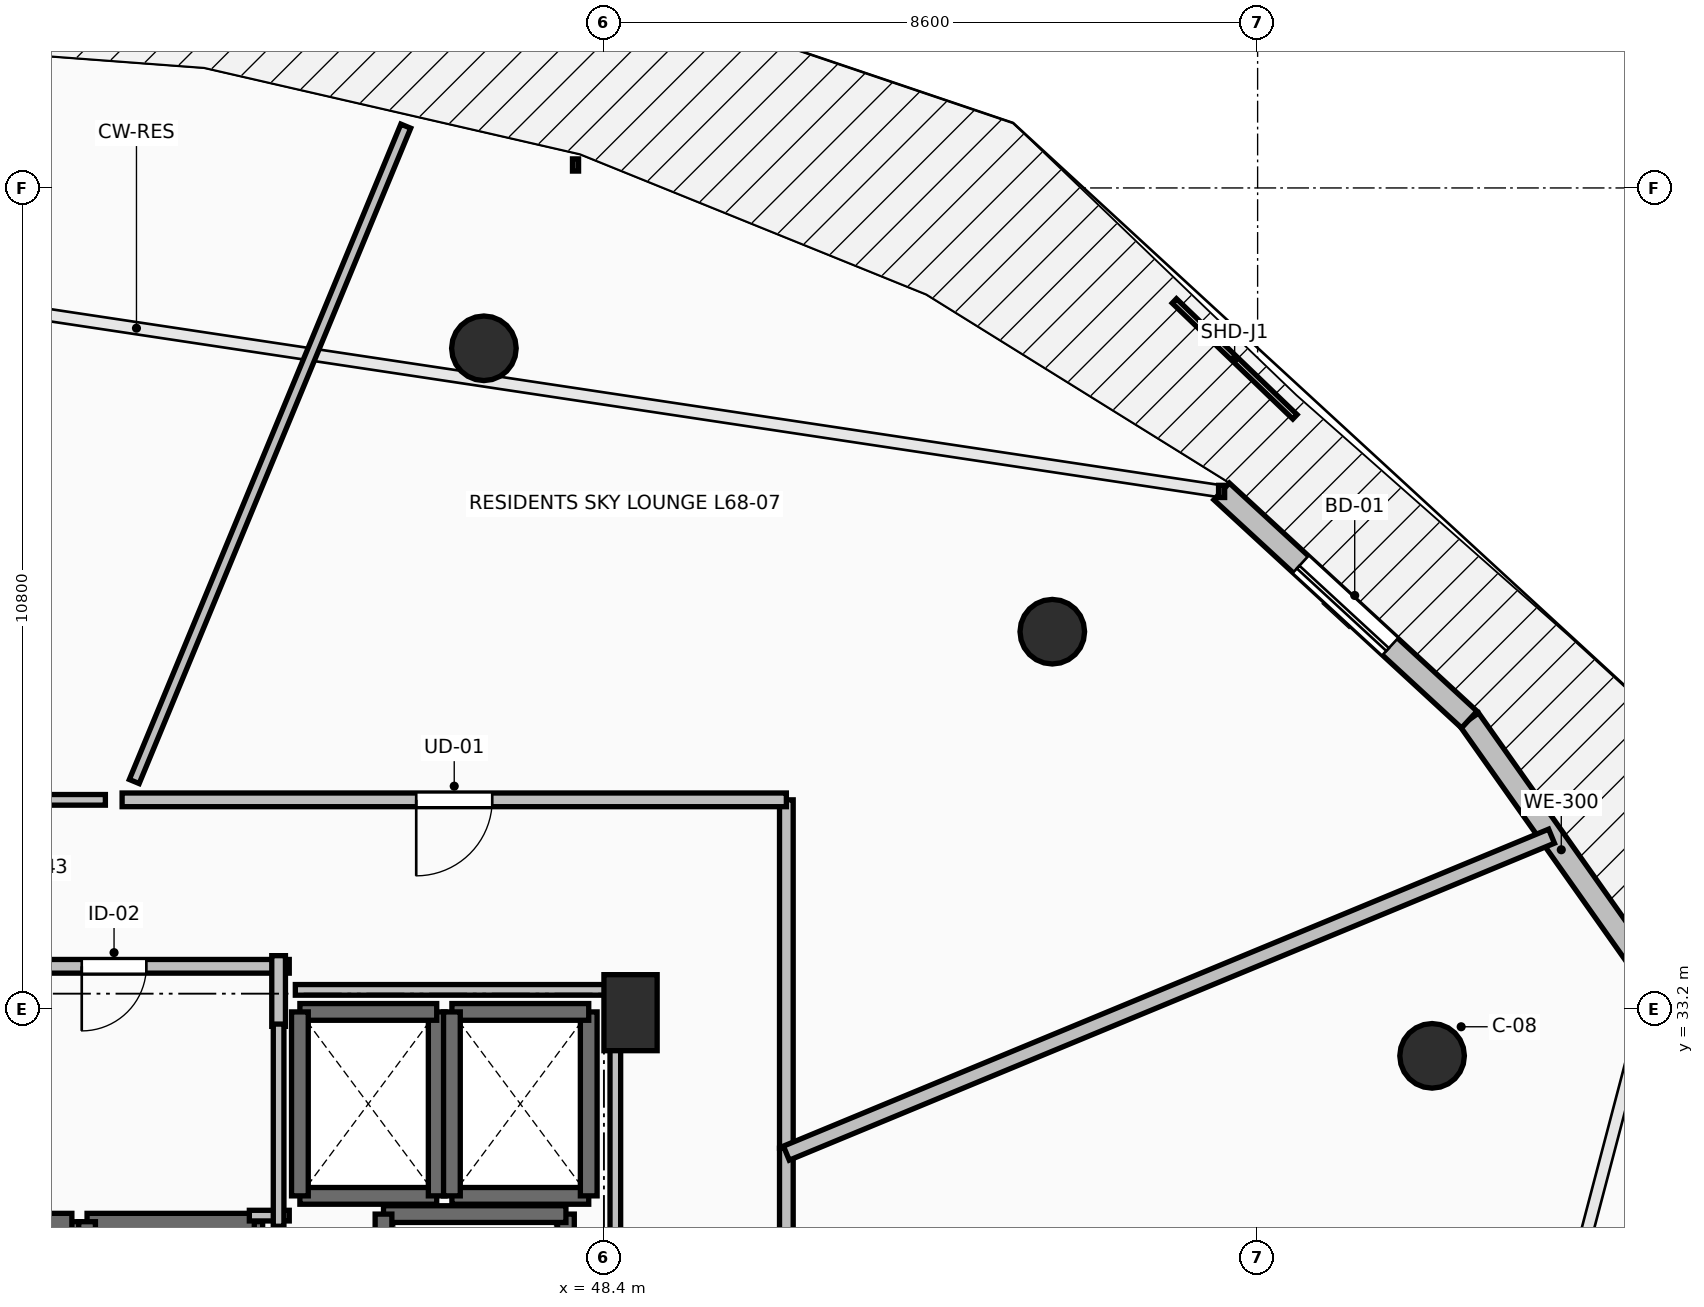
"""IFC4 building model, lengths in metres.
Left out: names, types, materials, properties, quantities, classifications, styles, units other than length and angle.
Written with IfcOpenShell. Run it as: python <this file> out.ifc"""

import sys

from ifc_helpers import new_model, si_unit, direction, frame, frame_2d, origin, origin_2d, place, context, subcontext, project, spatial, rectangle, circle, extrude, element, fill, save


model = new_model("IFC4")
c1 = context("Model", 3, precision=1e-05, world=origin(), true_north=direction((0.0, 1.0)))
c2 = subcontext(c1, "Body", "Model", "MODEL_VIEW")
j1 = project(units=[si_unit("LENGTHUNIT", "METRE"), si_unit("PLANEANGLEUNIT", "RADIAN")], contexts=[c1])
p1 = place(None, origin())
s1 = spatial("IfcSite", under=j1, at=p1, CompositionType="ELEMENT")
p2 = place(p1, origin())
s2 = spatial("IfcBuilding", under=s1, at=p2, CompositionType="ELEMENT")
p3 = place(p2, frame((0.0, 0.0, 252.0)))
s3 = spatial("IfcBuildingStorey", under=s2, at=p3, CompositionType="ELEMENT", Elevation=252.0)
for number, where, z_axis, x_axis in (
    (1, (59.295, 32.582, 0.0), (0.0, 0.0, 1.0), (0.924, 0.383, 0.0)),
    (2, (54.299, 38.162, 0.0), (0.0, 0.0, 1.0), (0.707, 0.707, 0.0)),
    (3, (46.821, 41.891, 0.0), (0.0, 0.0, 1.0), (0.383, 0.924, 0.0)),
):
    element("IfcColumn", number, at=place(p3, frame(where, z_axis=z_axis, x_axis=x_axis)), inside=s3, PredefinedType="COLUMN", context=c2, shape_type="SweptSolid", body=[
        extrude(circle(Radius=0.425, at=origin_2d()), origin(), (0.0, 0.0, 1.0), 3.55),
    ])
p4 = place(p3, frame((48.75, 33.15, 0.0), z_axis=(0.0, 0.0, 1.0), x_axis=(1.0, 0.0, 0.0)))
e4 = element("IfcColumn", 4, at=p4, inside=s3, PredefinedType="PILASTER", context=c2, shape_type="SweptSolid", body=[
    extrude(rectangle(XDim=0.7, YDim=1.0, at=origin_2d()), origin(), (0.0, 0.0, 1.0), 3.55),
])
p5 = place(p3, frame((62.206, 33.581, 0.0), z_axis=(0.0, 0.0, 1.0), x_axis=(-0.577261247247, 0.816559521668, 0.0)))
e5 = element("IfcWall", 5, at=p5, inside=s3, PredefinedType="STANDARD", context=c2, shape_type="SweptSolid", body=[
    extrude(rectangle(XDim=4.194, YDim=0.3, at=frame_2d((2.097, 0.0))), origin(), (0.0, 0.0, 1.0), 3.29),
])
p6 = place(p3, frame((59.784, 37.006, 0.0), z_axis=(0.0, 0.0, 1.0), x_axis=(-0.735445373611, 0.677584018727, 0.0)))
e6 = element("IfcWall", 6, at=p6, inside=s3, PredefinedType="STANDARD", context=c2, shape_type="SweptSolid", body=[
    extrude(rectangle(XDim=4.43, YDim=0.3, at=frame_2d((2.215, 0.0))), origin(), (0.0, 0.0, 1.0), 3.29),
])
p7 = place(p6, frame((1.415, 0.0, 0.0)))
e7 = element("IfcOpeningElement", 7, at=p7, cuts=e6, PredefinedType="OPENING", context=c2, shape_type="SweptSolid", body=[
    extrude(rectangle(XDim=1.6, YDim=2.3, at=frame_2d((0.8, 1.15))), frame((0.0, 0.165, 0.0), z_axis=(0.0, -1.0, 0.0), x_axis=(1.0, 0.0, 0.0)), (0.0, 0.0, 1.0), 0.33),
])
p8 = place(p3, frame((41.4, 27.8, 0.0), z_axis=(0.0, 0.0, 1.0), x_axis=(0.0, 1.0, 0.0)))
e8 = element("IfcWall", 8, at=p8, inside=s3, PredefinedType="SOLIDWALL", context=c2, shape_type="SweptSolid", body=[
    extrude(rectangle(XDim=2.6, YDim=0.22, at=frame_2d((1.3, 0.0))), origin(), (0.0, 0.0, 1.0), 3.29),
])
p9 = place(p3, frame((41.4, 30.4, 0.0), z_axis=(0.0, 0.0, 1.0), x_axis=(-1.0, 0.0, 0.0)))
e9 = element("IfcWall", 9, at=p9, inside=s3, PredefinedType="SOLIDWALL", context=c2, shape_type="SweptSolid", body=[
    extrude(rectangle(XDim=2.2, YDim=0.22, at=frame_2d((1.1, 0.0))), origin(), (0.0, 0.0, 1.0), 3.29),
])
p10 = place(p3, frame((43.8, 27.8, 0.0), z_axis=(0.0, 0.0, 1.0), x_axis=(0.0, 1.0, 0.0)))
e10 = element("IfcWall", 10, at=p10, inside=s3, PredefinedType="SOLIDWALL", context=c2, shape_type="SweptSolid", body=[
    extrude(rectangle(XDim=2.6, YDim=0.22, at=frame_2d((1.3, 0.0))), origin(), (0.0, 0.0, 1.0), 3.29),
])
p11 = place(p3, frame((43.8, 30.4, 0.0), z_axis=(0.0, 0.0, 1.0), x_axis=(-1.0, 0.0, 0.0)))
e11 = element("IfcWall", 11, at=p11, inside=s3, PredefinedType="SOLIDWALL", context=c2, shape_type="SweptSolid", body=[
    extrude(rectangle(XDim=2.2, YDim=0.22, at=frame_2d((1.1, 0.0))), origin(), (0.0, 0.0, 1.0), 3.29),
])
p12 = place(p3, frame((41.6, 30.4, 0.0), z_axis=(0.0, 0.0, 1.0), x_axis=(0.0, -1.0, 0.0)))
e12 = element("IfcWall", 12, at=p12, inside=s3, PredefinedType="SOLIDWALL", context=c2, shape_type="SweptSolid", body=[
    extrude(rectangle(XDim=2.6, YDim=0.22, at=frame_2d((1.3, 0.0))), origin(), (0.0, 0.0, 1.0), 3.29),
])
p13 = place(p3, frame((44.4, 30.74, 0.0), z_axis=(0.0, 0.0, 1.0), x_axis=(1.0, 0.0, 0.0)))
e13 = element("IfcWall", 13, at=p13, inside=s3, PredefinedType="SOLIDWALL", context=c2, shape_type="SweptSolid", body=[
    extrude(rectangle(XDim=1.8, YDim=0.22, at=frame_2d((0.9, 0.0))), origin(), (0.0, 0.0, 1.0), 3.29),
])
p14 = place(p3, frame((46.2, 30.74, 0.0), z_axis=(0.0, 0.0, 1.0), x_axis=(0.0, 1.0, 0.0)))
e14 = element("IfcWall", 14, at=p14, inside=s3, PredefinedType="SOLIDWALL", context=c2, shape_type="SweptSolid", body=[
    extrude(rectangle(XDim=2.42, YDim=0.22, at=frame_2d((1.21, 0.0))), origin(), (0.0, 0.0, 1.0), 3.29),
])
p15 = place(p3, frame((46.2, 33.16, 0.0), z_axis=(0.0, 0.0, 1.0), x_axis=(-1.0, 0.0, 0.0)))
e15 = element("IfcWall", 15, at=p15, inside=s3, PredefinedType="SOLIDWALL", context=c2, shape_type="SweptSolid", body=[
    extrude(rectangle(XDim=1.8, YDim=0.22, at=frame_2d((0.9, 0.0))), origin(), (0.0, 0.0, 1.0), 3.29),
])
p16 = place(p3, frame((44.4, 33.16, 0.0), z_axis=(0.0, 0.0, 1.0), x_axis=(0.0, -1.0, 0.0)))
e16 = element("IfcWall", 16, at=p16, inside=s3, PredefinedType="SOLIDWALL", context=c2, shape_type="SweptSolid", body=[
    extrude(rectangle(XDim=2.42, YDim=0.22, at=frame_2d((1.21, 0.0))), origin(), (0.0, 0.0, 1.0), 3.29),
])
p17 = place(p3, frame((46.4, 30.74, 0.0), z_axis=(0.0, 0.0, 1.0), x_axis=(1.0, 0.0, 0.0)))
e17 = element("IfcWall", 17, at=p17, inside=s3, PredefinedType="SOLIDWALL", context=c2, shape_type="SweptSolid", body=[
    extrude(rectangle(XDim=1.8, YDim=0.22, at=frame_2d((0.9, 0.0))), origin(), (0.0, 0.0, 1.0), 3.29),
])
p18 = place(p3, frame((48.2, 30.74, 0.0), z_axis=(0.0, 0.0, 1.0), x_axis=(0.0, 1.0, 0.0)))
e18 = element("IfcWall", 18, at=p18, inside=s3, PredefinedType="SOLIDWALL", context=c2, shape_type="SweptSolid", body=[
    extrude(rectangle(XDim=2.42, YDim=0.22, at=frame_2d((1.21, 0.0))), origin(), (0.0, 0.0, 1.0), 3.29),
])
p19 = place(p3, frame((48.2, 33.16, 0.0), z_axis=(0.0, 0.0, 1.0), x_axis=(-1.0, 0.0, 0.0)))
e19 = element("IfcWall", 19, at=p19, inside=s3, PredefinedType="SOLIDWALL", context=c2, shape_type="SweptSolid", body=[
    extrude(rectangle(XDim=1.8, YDim=0.22, at=frame_2d((0.9, 0.0))), origin(), (0.0, 0.0, 1.0), 3.29),
])
p20 = place(p3, frame((46.4, 33.16, 0.0), z_axis=(0.0, 0.0, 1.0), x_axis=(0.0, -1.0, 0.0)))
e20 = element("IfcWall", 20, at=p20, inside=s3, PredefinedType="SOLIDWALL", context=c2, shape_type="SweptSolid", body=[
    extrude(rectangle(XDim=2.42, YDim=0.22, at=frame_2d((1.21, 0.0))), origin(), (0.0, 0.0, 1.0), 3.29),
])
p21 = place(p3, frame((47.9, 28.0, 0.0), z_axis=(0.0, 0.0, 1.0), x_axis=(0.0, 1.0, 0.0)))
e21 = element("IfcWall", 21, at=p21, inside=s3, PredefinedType="SHEAR", context=c2, shape_type="SweptSolid", body=[
    extrude(rectangle(XDim=2.5, YDim=0.22, at=frame_2d((1.25, 0.0))), origin(), (0.0, 0.0, 1.0), 3.29),
])
p22 = place(p3, frame((47.9, 30.5, 0.0), z_axis=(0.0, 0.0, 1.0), x_axis=(-1.0, 0.0, 0.0)))
e22 = element("IfcWall", 22, at=p22, inside=s3, PredefinedType="SHEAR", context=c2, shape_type="SweptSolid", body=[
    extrude(rectangle(XDim=2.4, YDim=0.22, at=frame_2d((1.2, 0.0))), origin(), (0.0, 0.0, 1.0), 3.29),
])
p23 = place(p3, frame((45.5, 30.5, 0.0), z_axis=(0.0, 0.0, 1.0), x_axis=(0.0, -1.0, 0.0)))
e23 = element("IfcWall", 23, at=p23, inside=s3, PredefinedType="SHEAR", context=c2, shape_type="SweptSolid", body=[
    extrude(rectangle(XDim=2.5, YDim=0.22, at=frame_2d((1.25, 0.0))), origin(), (0.0, 0.0, 1.0), 3.29),
])
p24 = place(p3, frame((44.26, 33.76, 0.0), z_axis=(0.0, 0.0, 1.0), x_axis=(-1.0, 0.0, 0.0)))
e24 = element("IfcWall", 24, at=p24, inside=s3, PredefinedType="PARTITIONING", context=c2, shape_type="SweptSolid", body=[
    extrude(rectangle(XDim=4.61, YDim=0.18, at=frame_2d((2.305, 0.0))), origin(), (0.0, 0.0, 1.0), 3.29),
])
p25 = place(p24, frame((1.88, 0.0, 0.0)))
e25 = element("IfcOpeningElement", 25, at=p25, cuts=e24, PredefinedType="OPENING", context=c2, shape_type="SweptSolid", body=[
    extrude(rectangle(XDim=0.85, YDim=2.1, at=frame_2d((0.425, 1.05))), frame((0.0, 0.105, 0.0), z_axis=(0.0, -1.0, 0.0), x_axis=(1.0, 0.0, 0.0)), (0.0, 0.0, 1.0), 0.21),
])
p26 = place(p3, frame((44.12, 32.97, 0.0), z_axis=(0.0, 0.0, 1.0), x_axis=(0.0, 1.0, 0.0)))
e26 = element("IfcWall", 26, at=p26, inside=s3, PredefinedType="PARTITIONING", context=c2, shape_type="SweptSolid", body=[
    extrude(rectangle(XDim=0.93, YDim=0.18, at=frame_2d((0.465, 0.0))), origin(), (0.0, 0.0, 1.0), 3.29),
])
p27 = place(p3, frame((50.8, 20.758, 0.0), z_axis=(0.0, 0.0, 1.0), x_axis=(0.0, 1.0, 0.0)))
e27 = element("IfcWall", 27, at=p27, inside=s3, PredefinedType="PARTITIONING", context=c2, shape_type="SweptSolid", body=[
    extrude(rectangle(XDim=10.609, YDim=0.18, at=frame_2d((5.304, 0.0))), origin(), (0.0, 0.0, 1.0), 2.482),
])
p28 = place(p27, frame((4.804, 0.0, 0.0)))
e28 = element("IfcOpeningElement", 28, at=p28, cuts=e27, PredefinedType="OPENING", context=c2, shape_type="SweptSolid", body=[
    extrude(rectangle(XDim=1.0, YDim=2.15, at=frame_2d((0.5, 1.075))), frame((0.0, 0.105, 0.0), z_axis=(0.0, -1.0, 0.0), x_axis=(1.0, 0.0, 0.0)), (0.0, 0.0, 1.0), 0.21),
])
p29 = place(p3, frame((50.8, 31.367, 0.0), z_axis=(0.0, 0.0, 1.0), x_axis=(0.0, 1.0, 0.0)))
e29 = element("IfcWall", 29, at=p29, inside=s3, PredefinedType="PARTITIONING", context=c2, shape_type="SweptSolid", body=[
    extrude(rectangle(XDim=4.583, YDim=0.18, at=frame_2d((2.292, 0.0))), origin(), (0.0, 0.0, 1.0), 2.482),
])
p30 = place(p3, frame((50.8, 35.95, 0.0), z_axis=(0.0, 0.0, 1.0), x_axis=(-1.0, 0.0, 0.0)))
e30 = element("IfcWall", 30, at=p30, inside=s3, PredefinedType="PARTITIONING", context=c2, shape_type="SweptSolid", body=[
    extrude(rectangle(XDim=8.739, YDim=0.18, at=frame_2d((4.37, 0.0))), origin(), (0.0, 0.0, 1.0), 2.482),
])
p31 = place(p30, frame((3.869, 0.0, 0.0)))
e31 = element("IfcOpeningElement", 31, at=p31, cuts=e30, PredefinedType="OPENING", context=c2, shape_type="SweptSolid", body=[
    extrude(rectangle(XDim=1.0, YDim=2.15, at=frame_2d((0.5, 1.075))), frame((0.0, 0.105, 0.0), z_axis=(0.0, -1.0, 0.0), x_axis=(1.0, 0.0, 0.0)), (0.0, 0.0, 1.0), 0.21),
])
p32 = place(p3, frame((60.867, 35.472, 0.0), z_axis=(0.0, 0.0, 1.0), x_axis=(-0.923877013663, -0.382689513347, 0.0)))
e32 = element("IfcWall", 32, at=p32, inside=s3, PredefinedType="PARTITIONING", context=c2, shape_type="SweptSolid", body=[
    extrude(rectangle(XDim=10.896, YDim=0.2, at=frame_2d((5.448, 0.0))), origin(), (0.0, 0.0, 1.0), 2.482),
])
p33 = place(p3, frame((43.735, 30.48, 0.0), z_axis=(0.0, 0.0, 1.0), x_axis=(1.0, 0.0, 0.0)))
e33 = element("IfcWall", 33, at=p33, inside=s3, PredefinedType="PARTITIONING", context=c2, shape_type="SweptSolid", body=[
    extrude(rectangle(XDim=0.525, YDim=0.14, at=frame_2d((0.262, 0.0))), origin(), (0.0, 0.0, 1.0), 3.29),
])
p34 = place(p3, frame((44.12, 30.34, 0.0), z_axis=(0.0, 0.0, 1.0), x_axis=(0.0, 1.0, 0.0)))
e34 = element("IfcWall", 34, at=p34, inside=s3, PredefinedType="PARTITIONING", context=c2, shape_type="SweptSolid", body=[
    extrude(rectangle(XDim=2.66, YDim=0.14, at=frame_2d((1.33, 0.0))), origin(), (0.0, 0.0, 1.0), 3.29),
])
p35 = place(p3, frame((41.841, 35.95, 0.0), z_axis=(0.0, 0.0, 1.0), x_axis=(-1.0, 0.0, 0.0)))
e35 = element("IfcWall", 35, at=p35, inside=s3, PredefinedType="PARTITIONING", context=c2, shape_type="SweptSolid", body=[
    extrude(rectangle(XDim=2.391, YDim=0.14, at=frame_2d((1.196, 0.0))), origin(), (0.0, 0.0, 1.0), 3.022),
])
p36 = place(p3, frame((48.55, 28.196, 0.0), z_axis=(0.0, 0.0, 1.0), x_axis=(0.0, 1.0, 0.0)))
e36 = element("IfcWall", 36, at=p36, inside=s3, PredefinedType="PARTITIONING", context=c2, shape_type="SweptSolid", body=[
    extrude(rectangle(XDim=5.254, YDim=0.14, at=frame_2d((2.627, 0.0))), origin(), (0.0, 0.0, 1.0), 2.482),
])
p37 = place(p3, frame((48.55, 33.45, 0.0), z_axis=(0.0, 0.0, 1.0), x_axis=(-1.0, 0.0, 0.0)))
e37 = element("IfcWall", 37, at=p37, inside=s3, PredefinedType="PARTITIONING", context=c2, shape_type="SweptSolid", body=[
    extrude(rectangle(XDim=4.21, YDim=0.14, at=frame_2d((2.105, 0.0))), origin(), (0.0, 0.0, 1.0), 2.482),
])
p38 = place(p3, frame((45.793, 44.813, 0.0), z_axis=(0.0, 0.0, 1.0), x_axis=(-0.382742241568, -0.923855170749, 0.0)))
e38 = element("IfcWall", 38, at=p38, inside=s3, PredefinedType="PARTITIONING", context=c2, shape_type="SweptSolid", body=[
    extrude(rectangle(XDim=9.333, YDim=0.14, at=frame_2d((4.667, 0.0))), origin(), (0.0, 0.0, 1.0), 2.874),
])
p39 = place(p7, origin())
e39 = element("IfcDoor", 39, at=p39, inside=s3, OperationType="SLIDING_TO_LEFT", PredefinedType="DOOR", context=c2, shape_type="SweptSolid", body=[
    extrude(rectangle(XDim=1.6, YDim=2.3, at=frame_2d((0.8, 1.15))), frame((0.0, 0.025, 0.0), z_axis=(0.0, -1.0, 0.0), x_axis=(1.0, 0.0, 0.0)), (0.0, 0.0, 1.0), 0.05),
])
fill(e7, e39)
p40 = place(p25, origin())
e40 = element("IfcDoor", 40, at=p40, inside=s3, OperationType="SINGLE_SWING_RIGHT", PredefinedType="DOOR", context=c2, shape_type="SweptSolid", body=[
    extrude(rectangle(XDim=0.85, YDim=2.1, at=frame_2d((0.425, 1.05))), frame((0.0, 0.025, 0.0), z_axis=(0.0, -1.0, 0.0), x_axis=(1.0, 0.0, 0.0)), (0.0, 0.0, 1.0), 0.05),
])
fill(e25, e40)
p41 = place(p31, origin())
e41 = element("IfcDoor", 41, at=p41, inside=s3, OperationType="SINGLE_SWING_RIGHT", PredefinedType="DOOR", context=c2, shape_type="SweptSolid", body=[
    extrude(rectangle(XDim=1.0, YDim=2.15, at=frame_2d((0.5, 1.075))), frame((0.0, 0.025, 0.0), z_axis=(0.0, -1.0, 0.0), x_axis=(1.0, 0.0, 0.0)), (0.0, 0.0, 1.0), 0.05),
])
fill(e31, e41)
save(model, sys.argv[1])
